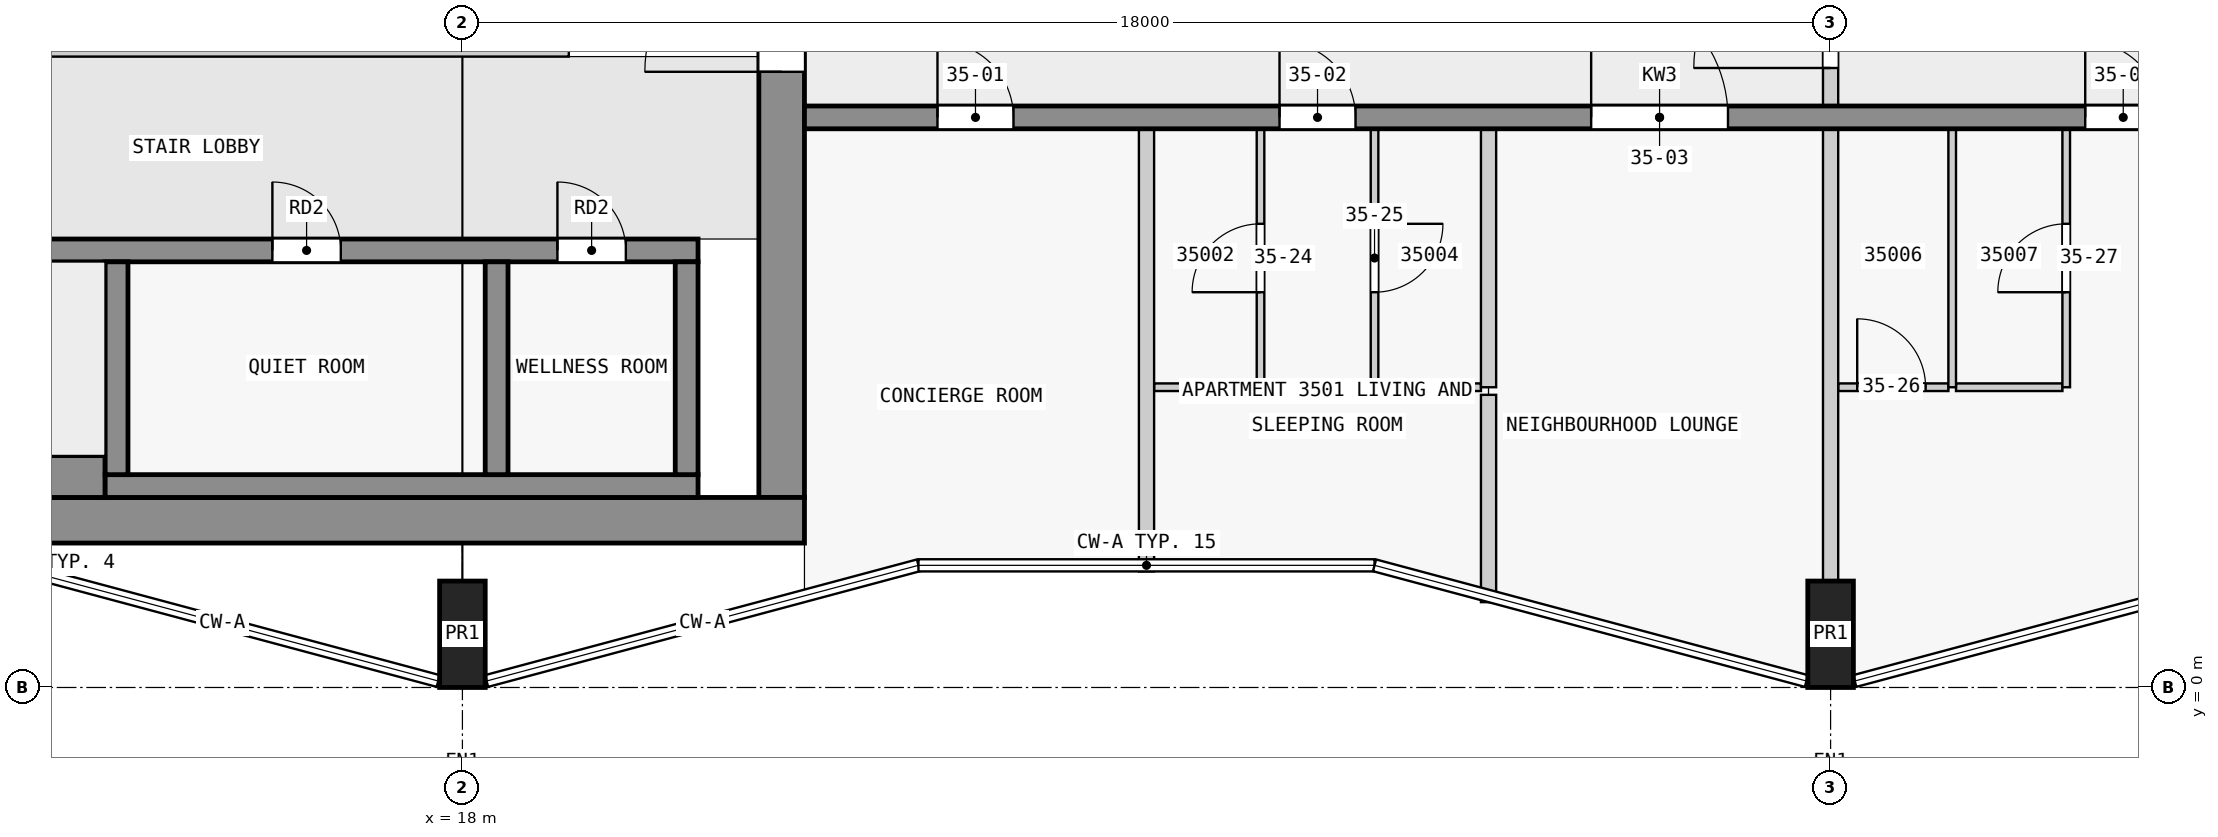
"""IFC4 building model, lengths in metres.
Left out: names, types, materials, properties, quantities, classifications, styles, units other than length and angle.
Written with IfcOpenShell. Run it as: python <this file> out.ifc"""

import sys

from ifc_helpers import new_model, si_unit, direction, frame, frame_2d, origin, origin_2d, place, context, subcontext, project, spatial, rectangle, extrude, element, fill, save


model = new_model("IFC4")
c1 = context("Model", 3, precision=1e-05, world=origin(), true_north=direction((0.0, 1.0)))
c2 = subcontext(c1, "Body", "Model", "MODEL_VIEW")
j1 = project(units=[si_unit("LENGTHUNIT", "METRE"), si_unit("PLANEANGLEUNIT", "RADIAN")], contexts=[c1])
p1 = place(None, origin())
s1 = spatial("IfcSite", under=j1, at=p1, CompositionType="ELEMENT")
p2 = place(p1, origin())
s2 = spatial("IfcBuilding", under=s1, at=p2, CompositionType="ELEMENT")
p3 = place(p2, frame((0.0, 0.0, 139.4)))
s3 = spatial("IfcBuildingStorey", under=s2, at=p3, CompositionType="ELEMENT", Elevation=139.4)
for number, where, z_axis, x_axis in (
    (1, (18.0, 0.7, 0.0), (0.0, 0.0, 1.0), (1.0, 0.0, 0.0)),
    (2, (36.0, 0.7, 0.0), (0.0, 0.0, 1.0), (1.0, 0.0, 0.0)),
):
    element("IfcColumn", number, at=place(p3, frame(where, z_axis=z_axis, x_axis=x_axis)), inside=s3, PredefinedType="COLUMN", context=c2, shape_type="SweptSolid", body=[
        extrude(rectangle(XDim=0.6, YDim=1.4, at=origin_2d()), origin(), (0.0, 0.0, 1.0), 3.5),
    ])
p4 = place(p3, frame((1.7, 2.2, 0.0), z_axis=(0.0, 0.0, 1.0), x_axis=(1.0, 0.0, 0.0)))
e3 = element("IfcWall", 3, at=p4, inside=s3, PredefinedType="SHEAR", context=c2, shape_type="SweptSolid", body=[
    extrude(rectangle(XDim=20.8, YDim=0.6, at=frame_2d((10.4, 0.0))), origin(), (0.0, 0.0, 1.0), 3.25),
])
p5 = place(p3, frame((22.2, 2.5, 0.0), z_axis=(0.0, 0.0, 1.0), x_axis=(0.0, 1.0, 0.0)))
e4 = element("IfcWall", 4, at=p5, inside=s3, PredefinedType="SHEAR", context=c2, shape_type="SweptSolid", body=[
    extrude(rectangle(XDim=14.9, YDim=0.6, at=frame_2d((7.45, 0.0))), origin(), (0.0, 0.0, 1.0), 3.25),
])
p6 = place(p5, frame((5.6, 0.0, 0.0)))
e5 = element("IfcOpeningElement", 5, at=p6, cuts=e4, PredefinedType="OPENING", context=c2, shape_type="SweptSolid", body=[
    extrude(rectangle(XDim=1.8, YDim=2.1, at=frame_2d((0.9, 1.05))), frame((0.0, 0.31, 0.0), z_axis=(0.0, -1.0, 0.0), x_axis=(1.0, 0.0, 0.0)), (0.0, 0.0, 1.0), 0.62),
])
p7 = place(p3, frame((6.9, 2.775, 0.0), z_axis=(0.0, 0.0, 1.0), x_axis=(1.0, 0.0, 0.0)))
e6 = element("IfcWall", 6, at=p7, inside=s3, PredefinedType="SHEAR", context=c2, shape_type="SweptSolid", body=[
    extrude(rectangle(XDim=6.4, YDim=0.55, at=frame_2d((3.2, 0.0))), origin(), (0.0, 0.0, 1.0), 3.25),
])
p8 = place(p3, frame((13.3, 2.65, 0.0), z_axis=(0.0, 0.0, 1.0), x_axis=(1.0, 0.0, 0.0)))
e7 = element("IfcWall", 7, at=p8, inside=s3, PredefinedType="SHEAR", context=c2, shape_type="SweptSolid", body=[
    extrude(rectangle(XDim=7.8, YDim=0.3, at=frame_2d((3.9, 0.0))), origin(), (0.0, 0.0, 1.0), 3.25),
])
for number, where, z_axis, x_axis in (
    (8, (13.45, 2.8, 0.0), (0.0, 0.0, 1.0), (0.0, 1.0, 0.0)),
    (9, (18.45, 2.8, 0.0), (0.0, 0.0, 1.0), (0.0, 1.0, 0.0)),
    (10, (20.95, 2.8, 0.0), (0.0, 0.0, 1.0), (0.0, 1.0, 0.0)),
):
    element("IfcWall", number, at=place(p3, frame(where, z_axis=z_axis, x_axis=x_axis)), inside=s3, PredefinedType="SHEAR", context=c2, shape_type="SweptSolid", body=[
        extrude(rectangle(XDim=2.8, YDim=0.3, at=frame_2d((1.4, 0.0))), origin(), (0.0, 0.0, 1.0), 3.25),
    ])
p9 = place(p3, frame((2.3, 5.75, 0.0), z_axis=(0.0, 0.0, 1.0), x_axis=(1.0, 0.0, 0.0)))
e11 = element("IfcWall", 11, at=p9, inside=s3, PredefinedType="SHEAR", context=c2, shape_type="SweptSolid", body=[
    extrude(rectangle(XDim=18.8, YDim=0.3, at=frame_2d((9.4, 0.0))), origin(), (0.0, 0.0, 1.0), 3.25),
])
p10 = place(p9, frame((4.65, 0.0, 0.0)))
e12 = element("IfcOpeningElement", 12, at=p10, cuts=e11, PredefinedType="OPENING", context=c2, shape_type="SweptSolid", body=[
    extrude(rectangle(XDim=1.1, YDim=2.1, at=frame_2d((0.55, 1.05))), frame((0.0, 0.16, 0.0), z_axis=(0.0, -1.0, 0.0), x_axis=(1.0, 0.0, 0.0)), (0.0, 0.0, 1.0), 0.32),
])
p11 = place(p9, frame((0.45, 0.0, 0.0)))
e13 = element("IfcOpeningElement", 13, at=p11, cuts=e11, PredefinedType="OPENING", context=c2, shape_type="SweptSolid", body=[
    extrude(rectangle(XDim=1.1, YDim=2.1, at=frame_2d((0.55, 1.05))), frame((0.0, 0.16, 0.0), z_axis=(0.0, -1.0, 0.0), x_axis=(1.0, 0.0, 0.0)), (0.0, 0.0, 1.0), 0.32),
])
p12 = place(p9, frame((2.75, 0.0, 0.0)))
e14 = element("IfcOpeningElement", 14, at=p12, cuts=e11, PredefinedType="OPENING", context=c2, shape_type="SweptSolid", body=[
    extrude(rectangle(XDim=1.1, YDim=2.1, at=frame_2d((0.55, 1.05))), frame((0.0, 0.16, 0.0), z_axis=(0.0, -1.0, 0.0), x_axis=(1.0, 0.0, 0.0)), (0.0, 0.0, 1.0), 0.32),
])
p13 = place(p9, frame((13.2, 0.0, 0.0)))
e15 = element("IfcOpeningElement", 15, at=p13, cuts=e11, PredefinedType="OPENING", context=c2, shape_type="SweptSolid", body=[
    extrude(rectangle(XDim=0.9, YDim=2.1, at=frame_2d((0.45, 1.05))), frame((0.0, 0.16, 0.0), z_axis=(0.0, -1.0, 0.0), x_axis=(1.0, 0.0, 0.0)), (0.0, 0.0, 1.0), 0.32),
])
p14 = place(p9, frame((16.95, 0.0, 0.0)))
e16 = element("IfcOpeningElement", 16, at=p14, cuts=e11, PredefinedType="OPENING", context=c2, shape_type="SweptSolid", body=[
    extrude(rectangle(XDim=0.9, YDim=2.1, at=frame_2d((0.45, 1.05))), frame((0.0, 0.16, 0.0), z_axis=(0.0, -1.0, 0.0), x_axis=(1.0, 0.0, 0.0)), (0.0, 0.0, 1.0), 0.32),
])
p15 = place(p3, frame((22.5, 7.5, 0.0), z_axis=(0.0, 0.0, 1.0), x_axis=(1.0, 0.0, 0.0)))
e17 = element("IfcWall", 17, at=p15, inside=s3, PredefinedType="SHEAR", context=c2, shape_type="SweptSolid", body=[
    extrude(rectangle(XDim=22.5, YDim=0.3, at=frame_2d((11.25, 0.0))), origin(), (0.0, 0.0, 1.0), 3.25),
])
p16 = place(p15, frame((1.75, 0.0, 0.0)))
e18 = element("IfcOpeningElement", 18, at=p16, cuts=e17, PredefinedType="OPENING", context=c2, shape_type="SweptSolid", body=[
    extrude(rectangle(XDim=1.0, YDim=2.1, at=frame_2d((0.5, 1.05))), frame((0.0, 0.16, 0.0), z_axis=(0.0, -1.0, 0.0), x_axis=(1.0, 0.0, 0.0)), (0.0, 0.0, 1.0), 0.32),
])
p17 = place(p15, frame((6.25, 0.0, 0.0)))
e19 = element("IfcOpeningElement", 19, at=p17, cuts=e17, PredefinedType="OPENING", context=c2, shape_type="SweptSolid", body=[
    extrude(rectangle(XDim=1.0, YDim=2.1, at=frame_2d((0.5, 1.05))), frame((0.0, 0.16, 0.0), z_axis=(0.0, -1.0, 0.0), x_axis=(1.0, 0.0, 0.0)), (0.0, 0.0, 1.0), 0.32),
])
p18 = place(p15, frame((10.35, 0.0, 0.0)))
e20 = element("IfcOpeningElement", 20, at=p18, cuts=e17, PredefinedType="OPENING", context=c2, shape_type="SweptSolid", body=[
    extrude(rectangle(XDim=1.8, YDim=2.1, at=frame_2d((0.9, 1.05))), frame((0.0, 0.16, 0.0), z_axis=(0.0, -1.0, 0.0), x_axis=(1.0, 0.0, 0.0)), (0.0, 0.0, 1.0), 0.32),
])
p19 = place(p15, frame((16.85, 0.0, 0.0)))
e21 = element("IfcOpeningElement", 21, at=p19, cuts=e17, PredefinedType="OPENING", context=c2, shape_type="SweptSolid", body=[
    extrude(rectangle(XDim=1.0, YDim=2.1, at=frame_2d((0.5, 1.05))), frame((0.0, 0.16, 0.0), z_axis=(0.0, -1.0, 0.0), x_axis=(1.0, 0.0, 0.0)), (0.0, 0.0, 1.0), 0.32),
])
p20 = place(p3, frame((10.9, 8.4, 0.0), z_axis=(0.0, 0.0, 1.0), x_axis=(1.0, 0.0, 0.0)))
e22 = element("IfcWall", 22, at=p20, inside=s3, PredefinedType="PARTITIONING", context=c2, shape_type="SweptSolid", body=[
    extrude(rectangle(XDim=8.5, YDim=0.2, at=frame_2d((4.25, 0.0))), origin(), (0.0, 0.0, 1.0), 3.25),
])
for number, where, z_axis, x_axis in (
    (23, (27.1, 3.95, 0.0), (0.0, 0.0, 1.0), (1.0, 0.0, 0.0)),
    (24, (30.05, 3.95, 0.0), (0.0, 0.0, 1.0), (1.0, 0.0, 0.0)),
):
    element("IfcWall", number, at=place(p3, frame(where, z_axis=z_axis, x_axis=x_axis)), inside=s3, PredefinedType="PARTITIONING", context=c2, shape_type="SweptSolid", body=[
        extrude(rectangle(XDim=1.35, YDim=0.1, at=frame_2d((0.675, 0.0))), origin(), (0.0, 0.0, 1.0), 3.25),
    ])
p21 = place(p3, frame((36.1, 3.95, 0.0), z_axis=(0.0, 0.0, 1.0), x_axis=(1.0, 0.0, 0.0)))
e25 = element("IfcWall", 25, at=p21, inside=s3, PredefinedType="PARTITIONING", context=c2, shape_type="SweptSolid", body=[
    extrude(rectangle(XDim=1.45, YDim=0.1, at=frame_2d((0.725, 0.0))), origin(), (0.0, 0.0, 1.0), 3.25),
])
p22 = place(p21, frame((0.25, 0.0, 0.0)))
e26 = element("IfcOpeningElement", 26, at=p22, cuts=e25, PredefinedType="OPENING", context=c2, shape_type="SweptSolid", body=[
    extrude(rectangle(XDim=0.9, YDim=2.1, at=frame_2d((0.45, 1.05))), frame((0.0, 0.06, 0.0), z_axis=(0.0, -1.0, 0.0), x_axis=(1.0, 0.0, 0.0)), (0.0, 0.0, 1.0), 0.12),
])
p23 = place(p3, frame((37.65, 3.95, 0.0), z_axis=(0.0, 0.0, 1.0), x_axis=(1.0, 0.0, 0.0)))
e27 = element("IfcWall", 27, at=p23, inside=s3, PredefinedType="PARTITIONING", context=c2, shape_type="SweptSolid", body=[
    extrude(rectangle(XDim=1.4, YDim=0.1, at=frame_2d((0.7, 0.0))), origin(), (0.0, 0.0, 1.0), 3.25),
])
p24 = place(p3, frame((27.0, 1.527, 0.0), z_axis=(0.0, 0.0, 1.0), x_axis=(0.0, 1.0, 0.0)))
e28 = element("IfcWall", 28, at=p24, inside=s3, PredefinedType="PARTITIONING", context=c2, shape_type="SweptSolid", body=[
    extrude(rectangle(XDim=5.823, YDim=0.2, at=frame_2d((2.912, 0.0))), origin(), (0.0, 0.0, 1.0), 3.25),
])
p25 = place(p3, frame((28.5, 3.95, 0.0), z_axis=(0.0, 0.0, 1.0), x_axis=(0.0, 1.0, 0.0)))
e29 = element("IfcWall", 29, at=p25, inside=s3, PredefinedType="PARTITIONING", context=c2, shape_type="SweptSolid", body=[
    extrude(rectangle(XDim=3.4, YDim=0.1, at=frame_2d((1.7, 0.0))), origin(), (0.0, 0.0, 1.0), 3.25),
])
p26 = place(p25, frame((1.25, 0.0, 0.0)))
e30 = element("IfcOpeningElement", 30, at=p26, cuts=e29, PredefinedType="OPENING", context=c2, shape_type="SweptSolid", body=[
    extrude(rectangle(XDim=0.9, YDim=2.1, at=frame_2d((0.45, 1.05))), frame((0.0, 0.06, 0.0), z_axis=(0.0, -1.0, 0.0), x_axis=(1.0, 0.0, 0.0)), (0.0, 0.0, 1.0), 0.12),
])
p27 = place(p3, frame((30.0, 7.35, 0.0), z_axis=(0.0, 0.0, 1.0), x_axis=(0.0, -1.0, 0.0)))
e31 = element("IfcWall", 31, at=p27, inside=s3, PredefinedType="PARTITIONING", context=c2, shape_type="SweptSolid", body=[
    extrude(rectangle(XDim=3.4, YDim=0.1, at=frame_2d((1.7, 0.0))), origin(), (0.0, 0.0, 1.0), 3.25),
])
p28 = place(p27, frame((1.25, 0.0, 0.0)))
e32 = element("IfcOpeningElement", 32, at=p28, cuts=e31, PredefinedType="OPENING", context=c2, shape_type="SweptSolid", body=[
    extrude(rectangle(XDim=0.9, YDim=2.1, at=frame_2d((0.45, 1.05))), frame((0.0, 0.06, 0.0), z_axis=(0.0, -1.0, 0.0), x_axis=(1.0, 0.0, 0.0)), (0.0, 0.0, 1.0), 0.12),
])
p29 = place(p3, frame((31.5, 3.85, 0.0), z_axis=(0.0, 0.0, 1.0), x_axis=(0.0, -1.0, 0.0)))
e33 = element("IfcWall", 33, at=p29, inside=s3, PredefinedType="PARTITIONING", context=c2, shape_type="SweptSolid", body=[
    extrude(rectangle(XDim=2.728, YDim=0.2, at=frame_2d((1.364, 0.0))), origin(), (0.0, 0.0, 1.0), 3.25),
])
p30 = place(p3, frame((31.5, 3.95, 0.0), z_axis=(0.0, 0.0, 1.0), x_axis=(0.0, 1.0, 0.0)))
e34 = element("IfcWall", 34, at=p30, inside=s3, PredefinedType="PARTITIONING", context=c2, shape_type="SweptSolid", body=[
    extrude(rectangle(XDim=3.4, YDim=0.2, at=frame_2d((1.7, 0.0))), origin(), (0.0, 0.0, 1.0), 3.25),
])
p31 = place(p3, frame((36.0, 1.4, 0.0), z_axis=(0.0, 0.0, 1.0), x_axis=(0.0, 1.0, 0.0)))
e35 = element("IfcWall", 35, at=p31, inside=s3, PredefinedType="PARTITIONING", context=c2, shape_type="SweptSolid", body=[
    extrude(rectangle(XDim=5.95, YDim=0.2, at=frame_2d((2.975, 0.0))), origin(), (0.0, 0.0, 1.0), 3.25),
])
p32 = place(p3, frame((37.6, 3.95, 0.0), z_axis=(0.0, 0.0, 1.0), x_axis=(0.0, 1.0, 0.0)))
e36 = element("IfcWall", 36, at=p32, inside=s3, PredefinedType="PARTITIONING", context=c2, shape_type="SweptSolid", body=[
    extrude(rectangle(XDim=3.4, YDim=0.1, at=frame_2d((1.7, 0.0))), origin(), (0.0, 0.0, 1.0), 3.25),
])
p33 = place(p3, frame((39.1, 3.95, 0.0), z_axis=(0.0, 0.0, 1.0), x_axis=(0.0, 1.0, 0.0)))
e37 = element("IfcWall", 37, at=p33, inside=s3, PredefinedType="PARTITIONING", context=c2, shape_type="SweptSolid", body=[
    extrude(rectangle(XDim=3.4, YDim=0.1, at=frame_2d((1.7, 0.0))), origin(), (0.0, 0.0, 1.0), 3.25),
])
p34 = place(p33, frame((1.25, 0.0, 0.0)))
e38 = element("IfcOpeningElement", 38, at=p34, cuts=e37, PredefinedType="OPENING", context=c2, shape_type="SweptSolid", body=[
    extrude(rectangle(XDim=0.9, YDim=2.1, at=frame_2d((0.45, 1.05))), frame((0.0, 0.06, 0.0), z_axis=(0.0, -1.0, 0.0), x_axis=(1.0, 0.0, 0.0)), (0.0, 0.0, 1.0), 0.12),
])
p35 = place(p3, frame((36.0, 7.45, 0.0), z_axis=(0.0, 0.0, 1.0), x_axis=(0.0, 1.0, 0.0)))
e39 = element("IfcWall", 39, at=p35, inside=s3, PredefinedType="PARTITIONING", context=c2, shape_type="SweptSolid", body=[
    extrude(rectangle(XDim=3.1, YDim=0.2, at=frame_2d((1.55, 0.0))), origin(), (0.0, 0.0, 1.0), 3.25),
])
p36 = place(p35, frame((0.7, 0.0, 0.0)))
e40 = element("IfcOpeningElement", 40, at=p36, cuts=e39, PredefinedType="OPENING", context=c2, shape_type="SweptSolid", body=[
    extrude(rectangle(XDim=1.8, YDim=2.1, at=frame_2d((0.9, 1.05))), frame((0.0, 0.11, 0.0), z_axis=(0.0, -1.0, 0.0), x_axis=(1.0, 0.0, 0.0)), (0.0, 0.0, 1.0), 0.22),
])
p37 = place(p6, origin())
e41 = element("IfcDoor", 41, at=p37, inside=s3, OperationType="DOUBLE_DOOR_SINGLE_SWING", PredefinedType="DOOR", context=c2, shape_type="SweptSolid", body=[
    extrude(rectangle(XDim=1.8, YDim=2.1, at=frame_2d((0.9, 1.05))), frame((0.0, 0.025, 0.0), z_axis=(0.0, -1.0, 0.0), x_axis=(1.0, 0.0, 0.0)), (0.0, 0.0, 1.0), 0.05),
])
fill(e5, e41)
p38 = place(p13, origin())
e42 = element("IfcDoor", 42, at=p38, inside=s3, OperationType="SINGLE_SWING_LEFT", PredefinedType="DOOR", context=c2, shape_type="SweptSolid", body=[
    extrude(rectangle(XDim=0.9, YDim=2.1, at=frame_2d((0.45, 1.05))), frame((0.0, 0.025, 0.0), z_axis=(0.0, -1.0, 0.0), x_axis=(1.0, 0.0, 0.0)), (0.0, 0.0, 1.0), 0.05),
])
fill(e15, e42)
p39 = place(p14, origin())
e43 = element("IfcDoor", 43, at=p39, inside=s3, OperationType="SINGLE_SWING_LEFT", PredefinedType="DOOR", context=c2, shape_type="SweptSolid", body=[
    extrude(rectangle(XDim=0.9, YDim=2.1, at=frame_2d((0.45, 1.05))), frame((0.0, 0.025, 0.0), z_axis=(0.0, -1.0, 0.0), x_axis=(1.0, 0.0, 0.0)), (0.0, 0.0, 1.0), 0.05),
])
fill(e16, e43)
p40 = place(p16, origin())
e44 = element("IfcDoor", 44, at=p40, inside=s3, OperationType="SINGLE_SWING_LEFT", PredefinedType="DOOR", context=c2, shape_type="SweptSolid", body=[
    extrude(rectangle(XDim=1.0, YDim=2.1, at=frame_2d((0.5, 1.05))), frame((0.0, 0.025, 0.0), z_axis=(0.0, -1.0, 0.0), x_axis=(1.0, 0.0, 0.0)), (0.0, 0.0, 1.0), 0.05),
])
fill(e18, e44)
p41 = place(p17, origin())
e45 = element("IfcDoor", 45, at=p41, inside=s3, OperationType="SINGLE_SWING_LEFT", PredefinedType="DOOR", context=c2, shape_type="SweptSolid", body=[
    extrude(rectangle(XDim=1.0, YDim=2.1, at=frame_2d((0.5, 1.05))), frame((0.0, 0.025, 0.0), z_axis=(0.0, -1.0, 0.0), x_axis=(1.0, 0.0, 0.0)), (0.0, 0.0, 1.0), 0.05),
])
fill(e19, e45)
p42 = place(p18, origin())
e46 = element("IfcDoor", 46, at=p42, inside=s3, OperationType="SINGLE_SWING_LEFT", PredefinedType="DOOR", context=c2, shape_type="SweptSolid", body=[
    extrude(rectangle(XDim=1.8, YDim=2.1, at=frame_2d((0.9, 1.05))), frame((0.0, 0.025, 0.0), z_axis=(0.0, -1.0, 0.0), x_axis=(1.0, 0.0, 0.0)), (0.0, 0.0, 1.0), 0.05),
])
fill(e20, e46)
p43 = place(p19, origin())
e47 = element("IfcDoor", 47, at=p43, inside=s3, OperationType="SINGLE_SWING_RIGHT", PredefinedType="DOOR", context=c2, shape_type="SweptSolid", body=[
    extrude(rectangle(XDim=1.0, YDim=2.1, at=frame_2d((0.5, 1.05))), frame((0.0, 0.025, 0.0), z_axis=(0.0, -1.0, 0.0), x_axis=(1.0, 0.0, 0.0)), (0.0, 0.0, 1.0), 0.05),
])
fill(e21, e47)
p44 = place(p36, origin())
e48 = element("IfcDoor", 48, at=p44, inside=s3, OperationType="SINGLE_SWING_RIGHT", PredefinedType="DOOR", context=c2, shape_type="SweptSolid", body=[
    extrude(rectangle(XDim=1.8, YDim=2.1, at=frame_2d((0.9, 1.05))), frame((0.0, 0.025, 0.0), z_axis=(0.0, -1.0, 0.0), x_axis=(1.0, 0.0, 0.0)), (0.0, 0.0, 1.0), 0.05),
])
fill(e40, e48)
p45 = place(p26, origin())
e49 = element("IfcDoor", 49, at=p45, inside=s3, OperationType="SINGLE_SWING_RIGHT", PredefinedType="DOOR", context=c2, shape_type="SweptSolid", body=[
    extrude(rectangle(XDim=0.9, YDim=2.1, at=frame_2d((0.45, 1.05))), frame((0.0, 0.025, 0.0), z_axis=(0.0, -1.0, 0.0), x_axis=(1.0, 0.0, 0.0)), (0.0, 0.0, 1.0), 0.05),
])
fill(e30, e49)
p46 = place(p28, origin())
e50 = element("IfcDoor", 50, at=p46, inside=s3, OperationType="SINGLE_SWING_RIGHT", PredefinedType="DOOR", context=c2, shape_type="SweptSolid", body=[
    extrude(rectangle(XDim=0.9, YDim=2.1, at=frame_2d((0.45, 1.05))), frame((0.0, 0.025, 0.0), z_axis=(0.0, -1.0, 0.0), x_axis=(1.0, 0.0, 0.0)), (0.0, 0.0, 1.0), 0.05),
])
fill(e32, e50)
p47 = place(p22, origin())
e51 = element("IfcDoor", 51, at=p47, inside=s3, OperationType="SINGLE_SWING_LEFT", PredefinedType="DOOR", context=c2, shape_type="SweptSolid", body=[
    extrude(rectangle(XDim=0.9, YDim=2.1, at=frame_2d((0.45, 1.05))), frame((0.0, 0.025, 0.0), z_axis=(0.0, -1.0, 0.0), x_axis=(1.0, 0.0, 0.0)), (0.0, 0.0, 1.0), 0.05),
])
fill(e26, e51)
p48 = place(p34, origin())
e52 = element("IfcDoor", 52, at=p48, inside=s3, OperationType="SINGLE_SWING_RIGHT", PredefinedType="DOOR", context=c2, shape_type="SweptSolid", body=[
    extrude(rectangle(XDim=0.9, YDim=2.1, at=frame_2d((0.45, 1.05))), frame((0.0, 0.025, 0.0), z_axis=(0.0, -1.0, 0.0), x_axis=(1.0, 0.0, 0.0)), (0.0, 0.0, 1.0), 0.05),
])
fill(e38, e52)
save(model, sys.argv[1])
